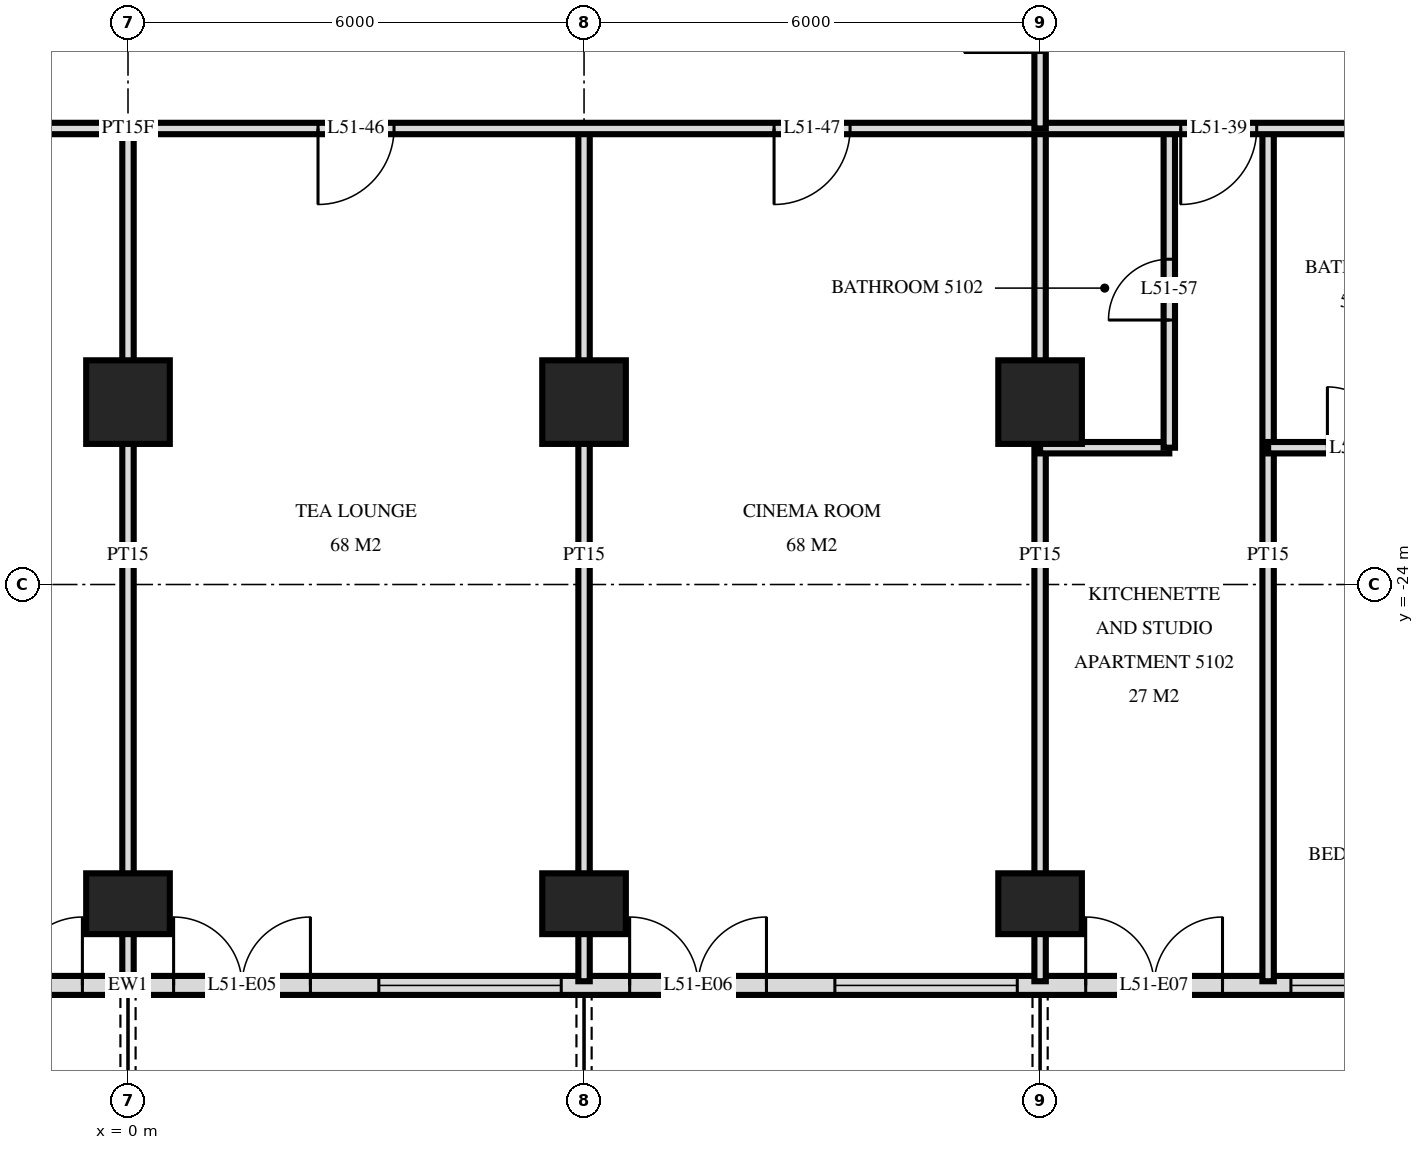
"""IFC4 building model, lengths in metres.
Left out: names, types, materials, properties, quantities, classifications, styles, units other than length and angle.
Written with IfcOpenShell. Run it as: python <this file> out.ifc"""

import sys

from ifc_helpers import new_model, si_unit, direction, frame, frame_2d, origin, origin_2d, place, context, subcontext, project, spatial, rectangle, extrude, element, fill, save


model = new_model("IFC4")
c1 = context("Model", 3, precision=1e-05, world=origin(), true_north=direction((0.0, 1.0)))
c2 = subcontext(c1, "Body", "Model", "MODEL_VIEW")
j1 = project(units=[si_unit("LENGTHUNIT", "METRE"), si_unit("PLANEANGLEUNIT", "RADIAN")], contexts=[c1])
p1 = place(None, origin())
s1 = spatial("IfcSite", under=j1, at=p1, CompositionType="ELEMENT")
p2 = place(p1, origin())
s2 = spatial("IfcBuilding", under=s1, at=p2, CompositionType="ELEMENT")
p3 = place(p2, frame((0.0, 0.0, 197.6)))
s3 = spatial("IfcBuildingStorey", under=s2, at=p3, CompositionType="ELEMENT", Elevation=197.6)
p4 = place(p3, frame((0.0, -28.2, 0.0), z_axis=(0.0, 0.0, 1.0), x_axis=(1.0, 0.0, 0.0)))
e1 = element("IfcColumn", 1, at=p4, inside=s3, PredefinedType="COLUMN", context=c2, shape_type="SweptSolid", body=[
    extrude(rectangle(XDim=1.1, YDim=0.8, at=origin_2d()), origin(), (0.0, 0.0, 1.0), 3.5),
])
p5 = place(p3, frame((0.0, -21.6, 0.0), z_axis=(0.0, 0.0, 1.0), x_axis=(1.0, 0.0, 0.0)))
e2 = element("IfcColumn", 2, at=p5, inside=s3, PredefinedType="COLUMN", context=c2, shape_type="SweptSolid", body=[
    extrude(rectangle(XDim=1.1, YDim=1.1, at=origin_2d()), origin(), (0.0, 0.0, 1.0), 3.5),
])
p6 = place(p3, frame((6.0, -28.2, 0.0), z_axis=(0.0, 0.0, 1.0), x_axis=(1.0, 0.0, 0.0)))
e3 = element("IfcColumn", 3, at=p6, inside=s3, PredefinedType="COLUMN", context=c2, shape_type="SweptSolid", body=[
    extrude(rectangle(XDim=1.1, YDim=0.8, at=origin_2d()), origin(), (0.0, 0.0, 1.0), 3.5),
])
p7 = place(p3, frame((6.0, -21.6, 0.0), z_axis=(0.0, 0.0, 1.0), x_axis=(1.0, 0.0, 0.0)))
e4 = element("IfcColumn", 4, at=p7, inside=s3, PredefinedType="COLUMN", context=c2, shape_type="SweptSolid", body=[
    extrude(rectangle(XDim=1.1, YDim=1.1, at=origin_2d()), origin(), (0.0, 0.0, 1.0), 3.5),
])
p8 = place(p3, frame((12.0, -28.2, 0.0), z_axis=(0.0, 0.0, 1.0), x_axis=(1.0, 0.0, 0.0)))
e5 = element("IfcColumn", 5, at=p8, inside=s3, PredefinedType="COLUMN", context=c2, shape_type="SweptSolid", body=[
    extrude(rectangle(XDim=1.1, YDim=0.8, at=origin_2d()), origin(), (0.0, 0.0, 1.0), 3.5),
])
p9 = place(p3, frame((12.0, -21.6, 0.0), z_axis=(0.0, 0.0, 1.0), x_axis=(1.0, 0.0, 0.0)))
e6 = element("IfcColumn", 6, at=p9, inside=s3, PredefinedType="COLUMN", context=c2, shape_type="SweptSolid", body=[
    extrude(rectangle(XDim=1.1, YDim=1.1, at=origin_2d()), origin(), (0.0, 0.0, 1.0), 3.5),
])
p10 = place(p3, frame((-22.475, -29.275, 0.0), z_axis=(0.0, 0.0, 1.0), x_axis=(1.0, 0.0, 0.0)))
e7 = element("IfcWall", 7, at=p10, inside=s3, PredefinedType="SOLIDWALL", context=c2, shape_type="SweptSolid", body=[
    extrude(rectangle(XDim=44.951, YDim=0.25, at=frame_2d((22.475, 0.0))), origin(), (0.0, 0.0, 1.0), 3.22),
])
p11 = place(p10, frame((0.575, 0.0, 0.0)))
e8 = element("IfcOpeningElement", 8, at=p11, cuts=e7, PredefinedType="OPENING", context=c2, shape_type="SweptSolid", body=[
    extrude(rectangle(XDim=1.8, YDim=2.4, at=frame_2d((0.9, 1.2))), frame((0.0, 0.135, 0.0), z_axis=(0.0, -1.0, 0.0), x_axis=(1.0, 0.0, 0.0)), (0.0, 0.0, 1.0), 0.27),
])
p12 = place(p10, frame((4.775, 0.0, 0.9)))
e9 = element("IfcOpeningElement", 9, at=p12, cuts=e7, PredefinedType="OPENING", context=c2, shape_type="SweptSolid", body=[
    extrude(rectangle(XDim=2.4, YDim=1.5, at=frame_2d((1.2, 0.75))), frame((0.0, 0.135, 0.0), z_axis=(0.0, -1.0, 0.0), x_axis=(1.0, 0.0, 0.0)), (0.0, 0.0, 1.0), 0.27),
])
p13 = place(p10, frame((8.075, 0.0, 0.0)))
e10 = element("IfcOpeningElement", 10, at=p13, cuts=e7, PredefinedType="OPENING", context=c2, shape_type="SweptSolid", body=[
    extrude(rectangle(XDim=1.8, YDim=2.4, at=frame_2d((0.9, 1.2))), frame((0.0, 0.135, 0.0), z_axis=(0.0, -1.0, 0.0), x_axis=(1.0, 0.0, 0.0)), (0.0, 0.0, 1.0), 0.27),
])
p14 = place(p10, frame((11.075, 0.0, 0.0)))
e11 = element("IfcOpeningElement", 11, at=p14, cuts=e7, PredefinedType="OPENING", context=c2, shape_type="SweptSolid", body=[
    extrude(rectangle(XDim=1.8, YDim=2.4, at=frame_2d((0.9, 1.2))), frame((0.0, 0.135, 0.0), z_axis=(0.0, -1.0, 0.0), x_axis=(1.0, 0.0, 0.0)), (0.0, 0.0, 1.0), 0.27),
])
p15 = place(p10, frame((13.775, 0.0, 0.9)))
e12 = element("IfcOpeningElement", 12, at=p15, cuts=e7, PredefinedType="OPENING", context=c2, shape_type="SweptSolid", body=[
    extrude(rectangle(XDim=2.4, YDim=1.5, at=frame_2d((1.2, 0.75))), frame((0.0, 0.135, 0.0), z_axis=(0.0, -1.0, 0.0), x_axis=(1.0, 0.0, 0.0)), (0.0, 0.0, 1.0), 0.27),
])
p16 = place(p10, frame((16.775, 0.0, 0.9)))
e13 = element("IfcOpeningElement", 13, at=p16, cuts=e7, PredefinedType="OPENING", context=c2, shape_type="SweptSolid", body=[
    extrude(rectangle(XDim=2.4, YDim=1.5, at=frame_2d((1.2, 0.75))), frame((0.0, 0.135, 0.0), z_axis=(0.0, -1.0, 0.0), x_axis=(1.0, 0.0, 0.0)), (0.0, 0.0, 1.0), 0.27),
])
p17 = place(p10, frame((20.075, 0.0, 0.0)))
e14 = element("IfcOpeningElement", 14, at=p17, cuts=e7, PredefinedType="OPENING", context=c2, shape_type="SweptSolid", body=[
    extrude(rectangle(XDim=1.8, YDim=2.4, at=frame_2d((0.9, 1.2))), frame((0.0, 0.135, 0.0), z_axis=(0.0, -1.0, 0.0), x_axis=(1.0, 0.0, 0.0)), (0.0, 0.0, 1.0), 0.27),
])
p18 = place(p10, frame((23.075, 0.0, 0.0)))
e15 = element("IfcOpeningElement", 15, at=p18, cuts=e7, PredefinedType="OPENING", context=c2, shape_type="SweptSolid", body=[
    extrude(rectangle(XDim=1.8, YDim=2.4, at=frame_2d((0.9, 1.2))), frame((0.0, 0.135, 0.0), z_axis=(0.0, -1.0, 0.0), x_axis=(1.0, 0.0, 0.0)), (0.0, 0.0, 1.0), 0.27),
])
p19 = place(p10, frame((25.775, 0.0, 0.9)))
e16 = element("IfcOpeningElement", 16, at=p19, cuts=e7, PredefinedType="OPENING", context=c2, shape_type="SweptSolid", body=[
    extrude(rectangle(XDim=2.4, YDim=1.5, at=frame_2d((1.2, 0.75))), frame((0.0, 0.135, 0.0), z_axis=(0.0, -1.0, 0.0), x_axis=(1.0, 0.0, 0.0)), (0.0, 0.0, 1.0), 0.27),
])
p20 = place(p10, frame((29.075, 0.0, 0.0)))
e17 = element("IfcOpeningElement", 17, at=p20, cuts=e7, PredefinedType="OPENING", context=c2, shape_type="SweptSolid", body=[
    extrude(rectangle(XDim=1.8, YDim=2.4, at=frame_2d((0.9, 1.2))), frame((0.0, 0.135, 0.0), z_axis=(0.0, -1.0, 0.0), x_axis=(1.0, 0.0, 0.0)), (0.0, 0.0, 1.0), 0.27),
])
p21 = place(p10, frame((31.775, 0.0, 0.9)))
e18 = element("IfcOpeningElement", 18, at=p21, cuts=e7, PredefinedType="OPENING", context=c2, shape_type="SweptSolid", body=[
    extrude(rectangle(XDim=2.4, YDim=1.5, at=frame_2d((1.2, 0.75))), frame((0.0, 0.135, 0.0), z_axis=(0.0, -1.0, 0.0), x_axis=(1.0, 0.0, 0.0)), (0.0, 0.0, 1.0), 0.27),
])
p22 = place(p10, frame((35.075, 0.0, 0.0)))
e19 = element("IfcOpeningElement", 19, at=p22, cuts=e7, PredefinedType="OPENING", context=c2, shape_type="SweptSolid", body=[
    extrude(rectangle(XDim=1.8, YDim=2.4, at=frame_2d((0.9, 1.2))), frame((0.0, 0.135, 0.0), z_axis=(0.0, -1.0, 0.0), x_axis=(1.0, 0.0, 0.0)), (0.0, 0.0, 1.0), 0.27),
])
p23 = place(p10, frame((37.775, 0.0, 0.9)))
e20 = element("IfcOpeningElement", 20, at=p23, cuts=e7, PredefinedType="OPENING", context=c2, shape_type="SweptSolid", body=[
    extrude(rectangle(XDim=2.4, YDim=1.5, at=frame_2d((1.2, 0.75))), frame((0.0, 0.135, 0.0), z_axis=(0.0, -1.0, 0.0), x_axis=(1.0, 0.0, 0.0)), (0.0, 0.0, 1.0), 0.27),
])
p24 = place(p10, frame((41.075, 0.0, 0.0)))
e21 = element("IfcOpeningElement", 21, at=p24, cuts=e7, PredefinedType="OPENING", context=c2, shape_type="SweptSolid", body=[
    extrude(rectangle(XDim=1.8, YDim=2.4, at=frame_2d((0.9, 1.2))), frame((0.0, 0.135, 0.0), z_axis=(0.0, -1.0, 0.0), x_axis=(1.0, 0.0, 0.0)), (0.0, 0.0, 1.0), 0.27),
])
p25 = place(p3, frame((15.0, -29.22, 0.0), z_axis=(0.0, 0.0, 1.0), x_axis=(0.0, 1.0, 0.0)))
e22 = element("IfcWall", 22, at=p25, inside=s3, PredefinedType="PARTITIONING", context=c2, shape_type="SweptSolid", body=[
    extrude(rectangle(XDim=11.22, YDim=0.15, at=frame_2d((5.61, 0.0))), origin(), (0.0, 0.0, 1.0), 3.22),
])
p26 = place(p3, frame((13.7, -22.2, 0.0), z_axis=(0.0, 0.0, 1.0), x_axis=(0.0, 1.0, 0.0)))
e23 = element("IfcWall", 23, at=p26, inside=s3, PredefinedType="PARTITIONING", context=c2, shape_type="SweptSolid", body=[
    extrude(rectangle(XDim=4.2, YDim=0.15, at=frame_2d((2.1, 0.0))), origin(), (0.0, 0.0, 1.0), 3.22),
])
p27 = place(p26, frame((1.68, 0.0, 0.0)))
e24 = element("IfcOpeningElement", 24, at=p27, cuts=e23, PredefinedType="OPENING", context=c2, shape_type="SweptSolid", body=[
    extrude(rectangle(XDim=0.8, YDim=2.1, at=frame_2d((0.4, 1.05))), frame((0.0, 0.085, 0.0), z_axis=(0.0, -1.0, 0.0), x_axis=(1.0, 0.0, 0.0)), (0.0, 0.0, 1.0), 0.17),
])
p28 = place(p3, frame((12.0, -18.0, 0.0), z_axis=(0.0, 0.0, 1.0), x_axis=(0.0, 1.0, 0.0)))
e25 = element("IfcWall", 25, at=p28, inside=s3, PredefinedType="PARTITIONING", context=c2, shape_type="SweptSolid", body=[
    extrude(rectangle(XDim=2.95, YDim=0.15, at=frame_2d((1.475, 0.0))), origin(), (0.0, 0.0, 1.0), 3.22),
])
p29 = place(p28, frame((1.0, 0.0, 0.0)))
e26 = element("IfcOpeningElement", 26, at=p29, cuts=e25, PredefinedType="OPENING", context=c2, shape_type="SweptSolid", body=[
    extrude(rectangle(XDim=1.0, YDim=2.1, at=frame_2d((0.5, 1.05))), frame((0.0, 0.085, 0.0), z_axis=(0.0, -1.0, 0.0), x_axis=(1.0, 0.0, 0.0)), (0.0, 0.0, 1.0), 0.17),
])
for number, where, z_axis, x_axis in (
    (27, (12.0, -29.22, 0.0), (0.0, 0.0, 1.0), (0.0, 1.0, 0.0)),
    (28, (6.0, -29.22, 0.0), (0.0, 0.0, 1.0), (0.0, 1.0, 0.0)),
    (29, (0.0, -29.22, 0.0), (0.0, 0.0, 1.0), (0.0, 1.0, 0.0)),
):
    element("IfcWall", number, at=place(p3, frame(where, z_axis=z_axis, x_axis=x_axis)), inside=s3, PredefinedType="PARTITIONING", context=c2, shape_type="SweptSolid", body=[
        extrude(rectangle(XDim=11.22, YDim=0.15, at=frame_2d((5.61, 0.0))), origin(), (0.0, 0.0, 1.0), 3.22),
    ])
p30 = place(p3, frame((12.0, -22.2, 0.0), z_axis=(0.0, 0.0, 1.0), x_axis=(1.0, 0.0, 0.0)))
e30 = element("IfcWall", 30, at=p30, inside=s3, PredefinedType="PARTITIONING", context=c2, shape_type="SweptSolid", body=[
    extrude(rectangle(XDim=1.7, YDim=0.15, at=frame_2d((0.85, 0.0))), origin(), (0.0, 0.0, 1.0), 3.22),
])
p31 = place(p3, frame((15.0, -22.2, 0.0), z_axis=(0.0, 0.0, 1.0), x_axis=(1.0, 0.0, 0.0)))
e31 = element("IfcWall", 31, at=p31, inside=s3, PredefinedType="PARTITIONING", context=c2, shape_type="SweptSolid", body=[
    extrude(rectangle(XDim=6.4, YDim=0.15, at=frame_2d((3.2, 0.0))), origin(), (0.0, 0.0, 1.0), 3.22),
])
p32 = place(p31, frame((0.78, 0.0, 0.0)))
e32 = element("IfcOpeningElement", 32, at=p32, cuts=e31, PredefinedType="OPENING", context=c2, shape_type="SweptSolid", body=[
    extrude(rectangle(XDim=0.8, YDim=2.1, at=frame_2d((0.4, 1.05))), frame((0.0, 0.085, 0.0), z_axis=(0.0, -1.0, 0.0), x_axis=(1.0, 0.0, 0.0)), (0.0, 0.0, 1.0), 0.17),
])
p33 = place(p31, frame((3.65, 0.0, 0.0)))
e33 = element("IfcOpeningElement", 33, at=p33, cuts=e31, PredefinedType="OPENING", context=c2, shape_type="SweptSolid", body=[
    extrude(rectangle(XDim=0.8, YDim=2.1, at=frame_2d((0.4, 1.05))), frame((0.0, 0.085, 0.0), z_axis=(0.0, -1.0, 0.0), x_axis=(1.0, 0.0, 0.0)), (0.0, 0.0, 1.0), 0.17),
])
p34 = place(p3, frame((-26.82, -18.0, 0.0), z_axis=(0.0, 0.0, 1.0), x_axis=(1.0, 0.0, 0.0)))
e34 = element("IfcWall", 34, at=p34, inside=s3, PredefinedType="PARTITIONING", context=c2, shape_type="SweptSolid", body=[
    extrude(rectangle(XDim=53.64, YDim=0.15, at=frame_2d((26.82, 0.0))), origin(), (0.0, 0.0, 1.0), 3.22),
])
p35 = place(p34, frame((11.97, 0.0, 0.0)))
e35 = element("IfcOpeningElement", 35, at=p35, cuts=e34, PredefinedType="OPENING", context=c2, shape_type="SweptSolid", body=[
    extrude(rectangle(XDim=1.0, YDim=2.1, at=frame_2d((0.5, 1.05))), frame((0.0, 0.085, 0.0), z_axis=(0.0, -1.0, 0.0), x_axis=(1.0, 0.0, 0.0)), (0.0, 0.0, 1.0), 0.17),
])
p36 = place(p34, frame((3.92, 0.0, 0.0)))
e36 = element("IfcOpeningElement", 36, at=p36, cuts=e34, PredefinedType="OPENING", context=c2, shape_type="SweptSolid", body=[
    extrude(rectangle(XDim=1.0, YDim=2.1, at=frame_2d((0.5, 1.05))), frame((0.0, 0.085, 0.0), z_axis=(0.0, -1.0, 0.0), x_axis=(1.0, 0.0, 0.0)), (0.0, 0.0, 1.0), 0.17),
])
p37 = place(p34, frame((5.72, 0.0, 0.0)))
e37 = element("IfcOpeningElement", 37, at=p37, cuts=e34, PredefinedType="OPENING", context=c2, shape_type="SweptSolid", body=[
    extrude(rectangle(XDim=1.0, YDim=2.1, at=frame_2d((0.5, 1.05))), frame((0.0, 0.085, 0.0), z_axis=(0.0, -1.0, 0.0), x_axis=(1.0, 0.0, 0.0)), (0.0, 0.0, 1.0), 0.17),
])
p38 = place(p34, frame((40.67, 0.0, 0.0)))
e38 = element("IfcOpeningElement", 38, at=p38, cuts=e34, PredefinedType="OPENING", context=c2, shape_type="SweptSolid", body=[
    extrude(rectangle(XDim=1.0, YDim=2.1, at=frame_2d((0.5, 1.05))), frame((0.0, 0.085, 0.0), z_axis=(0.0, -1.0, 0.0), x_axis=(1.0, 0.0, 0.0)), (0.0, 0.0, 1.0), 0.17),
])
p39 = place(p34, frame((48.72, 0.0, 0.0)))
e39 = element("IfcOpeningElement", 39, at=p39, cuts=e34, PredefinedType="OPENING", context=c2, shape_type="SweptSolid", body=[
    extrude(rectangle(XDim=1.0, YDim=2.1, at=frame_2d((0.5, 1.05))), frame((0.0, 0.085, 0.0), z_axis=(0.0, -1.0, 0.0), x_axis=(1.0, 0.0, 0.0)), (0.0, 0.0, 1.0), 0.17),
])
p40 = place(p34, frame((46.92, 0.0, 0.0)))
e40 = element("IfcOpeningElement", 40, at=p40, cuts=e34, PredefinedType="OPENING", context=c2, shape_type="SweptSolid", body=[
    extrude(rectangle(XDim=1.0, YDim=2.1, at=frame_2d((0.5, 1.05))), frame((0.0, 0.085, 0.0), z_axis=(0.0, -1.0, 0.0), x_axis=(1.0, 0.0, 0.0)), (0.0, 0.0, 1.0), 0.17),
])
p41 = place(p34, frame((17.32, 0.0, 0.0)))
e41 = element("IfcOpeningElement", 41, at=p41, cuts=e34, PredefinedType="OPENING", context=c2, shape_type="SweptSolid", body=[
    extrude(rectangle(XDim=1.0, YDim=2.1, at=frame_2d((0.5, 1.05))), frame((0.0, 0.085, 0.0), z_axis=(0.0, -1.0, 0.0), x_axis=(1.0, 0.0, 0.0)), (0.0, 0.0, 1.0), 0.17),
])
p42 = place(p34, frame((23.32, 0.0, 0.0)))
e42 = element("IfcOpeningElement", 42, at=p42, cuts=e34, PredefinedType="OPENING", context=c2, shape_type="SweptSolid", body=[
    extrude(rectangle(XDim=1.0, YDim=2.1, at=frame_2d((0.5, 1.05))), frame((0.0, 0.085, 0.0), z_axis=(0.0, -1.0, 0.0), x_axis=(1.0, 0.0, 0.0)), (0.0, 0.0, 1.0), 0.17),
])
p43 = place(p34, frame((29.32, 0.0, 0.0)))
e43 = element("IfcOpeningElement", 43, at=p43, cuts=e34, PredefinedType="OPENING", context=c2, shape_type="SweptSolid", body=[
    extrude(rectangle(XDim=1.0, YDim=2.1, at=frame_2d((0.5, 1.05))), frame((0.0, 0.085, 0.0), z_axis=(0.0, -1.0, 0.0), x_axis=(1.0, 0.0, 0.0)), (0.0, 0.0, 1.0), 0.17),
])
p44 = place(p34, frame((35.32, 0.0, 0.0)))
e44 = element("IfcOpeningElement", 44, at=p44, cuts=e34, PredefinedType="OPENING", context=c2, shape_type="SweptSolid", body=[
    extrude(rectangle(XDim=1.0, YDim=2.1, at=frame_2d((0.5, 1.05))), frame((0.0, 0.085, 0.0), z_axis=(0.0, -1.0, 0.0), x_axis=(1.0, 0.0, 0.0)), (0.0, 0.0, 1.0), 0.17),
])
p45 = place(p17, origin())
e45 = element("IfcDoor", 45, at=p45, inside=s3, OperationType="DOUBLE_DOOR_SINGLE_SWING", PredefinedType="DOOR", context=c2, shape_type="SweptSolid", body=[
    extrude(rectangle(XDim=1.8, YDim=2.4, at=frame_2d((0.9, 1.2))), frame((0.0, 0.025, 0.0), z_axis=(0.0, -1.0, 0.0), x_axis=(1.0, 0.0, 0.0)), (0.0, 0.0, 1.0), 0.05),
])
fill(e14, e45)
p46 = place(p18, origin())
e46 = element("IfcDoor", 46, at=p46, inside=s3, OperationType="DOUBLE_DOOR_SINGLE_SWING", PredefinedType="DOOR", context=c2, shape_type="SweptSolid", body=[
    extrude(rectangle(XDim=1.8, YDim=2.4, at=frame_2d((0.9, 1.2))), frame((0.0, 0.025, 0.0), z_axis=(0.0, -1.0, 0.0), x_axis=(1.0, 0.0, 0.0)), (0.0, 0.0, 1.0), 0.05),
])
fill(e15, e46)
p47 = place(p19, origin())
e47 = element("IfcWindow", 47, at=p47, inside=s3, PartitioningType="SINGLE_PANEL", PredefinedType="WINDOW", context=c2, shape_type="SweptSolid", body=[
    extrude(rectangle(XDim=2.4, YDim=1.5, at=frame_2d((1.2, 0.75))), frame((0.0, 0.03, 0.0), z_axis=(0.0, -1.0, 0.0), x_axis=(1.0, 0.0, 0.0)), (0.0, 0.0, 1.0), 0.06),
])
fill(e16, e47)
p48 = place(p20, origin())
e48 = element("IfcDoor", 48, at=p48, inside=s3, OperationType="DOUBLE_DOOR_SINGLE_SWING", PredefinedType="DOOR", context=c2, shape_type="SweptSolid", body=[
    extrude(rectangle(XDim=1.8, YDim=2.4, at=frame_2d((0.9, 1.2))), frame((0.0, 0.025, 0.0), z_axis=(0.0, -1.0, 0.0), x_axis=(1.0, 0.0, 0.0)), (0.0, 0.0, 1.0), 0.05),
])
fill(e17, e48)
p49 = place(p21, origin())
e49 = element("IfcWindow", 49, at=p49, inside=s3, PartitioningType="SINGLE_PANEL", PredefinedType="WINDOW", context=c2, shape_type="SweptSolid", body=[
    extrude(rectangle(XDim=2.4, YDim=1.5, at=frame_2d((1.2, 0.75))), frame((0.0, 0.03, 0.0), z_axis=(0.0, -1.0, 0.0), x_axis=(1.0, 0.0, 0.0)), (0.0, 0.0, 1.0), 0.06),
])
fill(e18, e49)
p50 = place(p22, origin())
e50 = element("IfcDoor", 50, at=p50, inside=s3, OperationType="DOUBLE_DOOR_SINGLE_SWING", PredefinedType="DOOR", context=c2, shape_type="SweptSolid", body=[
    extrude(rectangle(XDim=1.8, YDim=2.4, at=frame_2d((0.9, 1.2))), frame((0.0, 0.025, 0.0), z_axis=(0.0, -1.0, 0.0), x_axis=(1.0, 0.0, 0.0)), (0.0, 0.0, 1.0), 0.05),
])
fill(e19, e50)
p51 = place(p23, origin())
e51 = element("IfcWindow", 51, at=p51, inside=s3, PartitioningType="SINGLE_PANEL", PredefinedType="WINDOW", context=c2, shape_type="SweptSolid", body=[
    extrude(rectangle(XDim=2.4, YDim=1.5, at=frame_2d((1.2, 0.75))), frame((0.0, 0.03, 0.0), z_axis=(0.0, -1.0, 0.0), x_axis=(1.0, 0.0, 0.0)), (0.0, 0.0, 1.0), 0.06),
])
fill(e20, e51)
p52 = place(p38, frame((0.5, 0.0, 0.0), z_axis=(0.0, 0.0, 1.0), x_axis=(-1.0, 0.0, 0.0)))
e52 = element("IfcDoor", 52, at=p52, inside=s3, OperationType="SINGLE_SWING_LEFT", PredefinedType="DOOR", context=c2, shape_type="SweptSolid", body=[
    extrude(rectangle(XDim=1.0, YDim=2.1, at=frame_2d((0.0, 1.05))), frame((0.0, -0.025, 0.0), z_axis=(0.0, 1.0, 0.0), x_axis=(-1.0, 0.0, 0.0)), (0.0, 0.0, 1.0), 0.05),
])
fill(e38, e52)
p53 = place(p43, frame((0.5, 0.0, 0.0), z_axis=(0.0, 0.0, 1.0), x_axis=(-1.0, 0.0, 0.0)))
e53 = element("IfcDoor", 53, at=p53, inside=s3, OperationType="SINGLE_SWING_LEFT", PredefinedType="DOOR", context=c2, shape_type="SweptSolid", body=[
    extrude(rectangle(XDim=1.0, YDim=2.1, at=frame_2d((0.0, 1.05))), frame((0.0, -0.025, 0.0), z_axis=(0.0, 1.0, 0.0), x_axis=(-1.0, 0.0, 0.0)), (0.0, 0.0, 1.0), 0.05),
])
fill(e43, e53)
p54 = place(p44, frame((0.5, 0.0, 0.0), z_axis=(0.0, 0.0, 1.0), x_axis=(-1.0, 0.0, 0.0)))
e54 = element("IfcDoor", 54, at=p54, inside=s3, OperationType="SINGLE_SWING_LEFT", PredefinedType="DOOR", context=c2, shape_type="SweptSolid", body=[
    extrude(rectangle(XDim=1.0, YDim=2.1, at=frame_2d((0.0, 1.05))), frame((0.0, -0.025, 0.0), z_axis=(0.0, 1.0, 0.0), x_axis=(-1.0, 0.0, 0.0)), (0.0, 0.0, 1.0), 0.05),
])
fill(e44, e54)
p55 = place(p27, origin())
e55 = element("IfcDoor", 55, at=p55, inside=s3, OperationType="SINGLE_SWING_RIGHT", PredefinedType="DOOR", context=c2, shape_type="SweptSolid", body=[
    extrude(rectangle(XDim=0.8, YDim=2.1, at=frame_2d((0.4, 1.05))), frame((0.0, 0.025, 0.0), z_axis=(0.0, -1.0, 0.0), x_axis=(1.0, 0.0, 0.0)), (0.0, 0.0, 1.0), 0.05),
])
fill(e24, e55)
p56 = place(p32, origin())
e56 = element("IfcDoor", 56, at=p56, inside=s3, OperationType="SINGLE_SWING_RIGHT", PredefinedType="DOOR", context=c2, shape_type="SweptSolid", body=[
    extrude(rectangle(XDim=0.8, YDim=2.1, at=frame_2d((0.4, 1.05))), frame((0.0, 0.025, 0.0), z_axis=(0.0, -1.0, 0.0), x_axis=(1.0, 0.0, 0.0)), (0.0, 0.0, 1.0), 0.05),
])
fill(e32, e56)
save(model, sys.argv[1])
